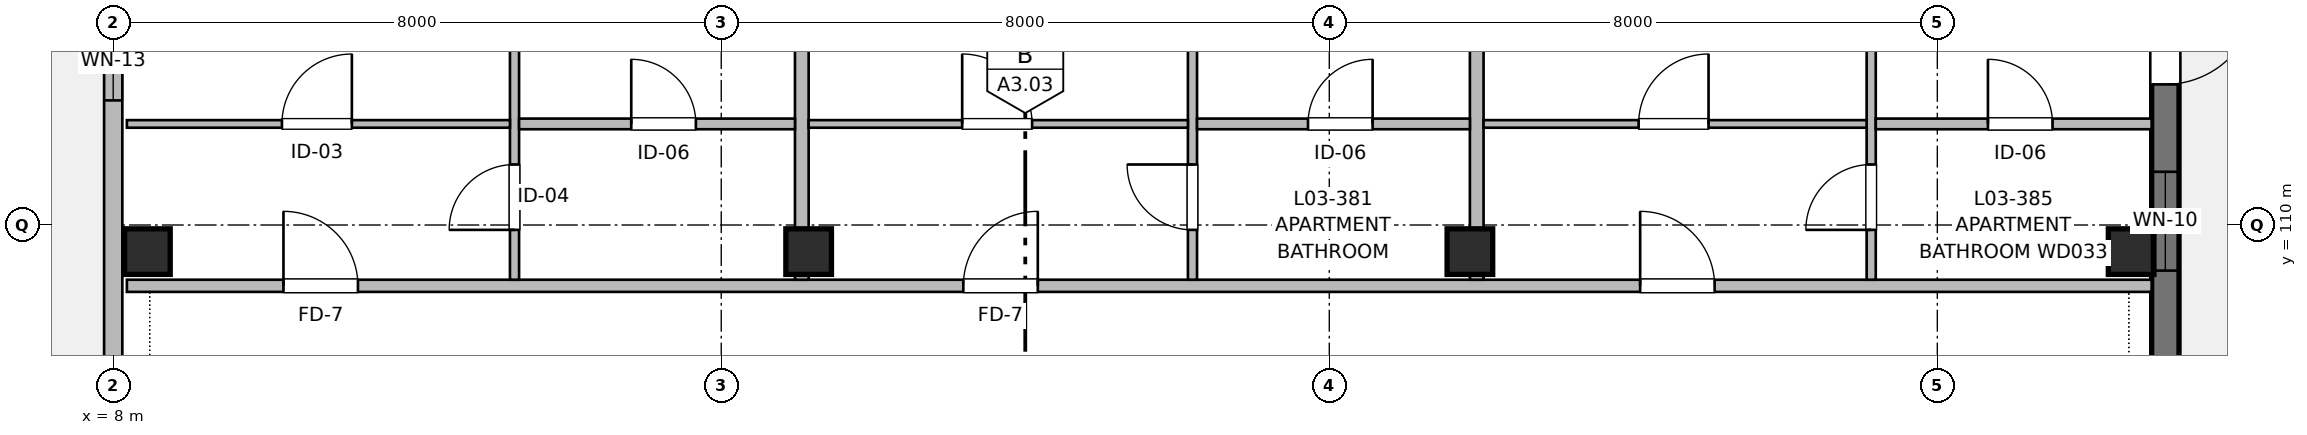
"""IFC4 building model, lengths in metres.
Left out: names, types, materials, properties, quantities, classifications, styles, units other than length and angle.
Written with IfcOpenShell. Run it as: python <this file> out.ifc"""

import sys

from ifc_helpers import new_model, si_unit, direction, frame, frame_2d, origin, origin_2d, place, context, subcontext, project, spatial, rectangle, extrude, element, fill, save


model = new_model("IFC4")
c1 = context("Model", 3, precision=1e-05, world=origin(), true_north=direction((0.0, 1.0)))
c2 = subcontext(c1, "Body", "Model", "MODEL_VIEW")
j1 = project(units=[si_unit("LENGTHUNIT", "METRE"), si_unit("PLANEANGLEUNIT", "RADIAN")], contexts=[c1])
p1 = place(None, origin())
s1 = spatial("IfcSite", under=j1, at=p1, CompositionType="ELEMENT")
p2 = place(p1, origin())
s2 = spatial("IfcBuilding", under=s1, at=p2, CompositionType="ELEMENT")
p3 = place(p2, frame((0.0, 0.0, 10.56)))
s3 = spatial("IfcBuildingStorey", under=s2, at=p3, CompositionType="ELEMENT", Elevation=10.56)
for number, where, z_axis, x_axis in (
    (1, (8.45, 109.65, 0.0), (0.0, 0.0, 1.0), (1.0, 0.0, 0.0)),
    (2, (17.15, 109.65, 0.0), (0.0, 0.0, 1.0), (1.0, 0.0, 0.0)),
    (3, (25.85, 109.65, 0.0), (0.0, 0.0, 1.0), (1.0, 0.0, 0.0)),
    (4, (34.55, 109.65, 0.0), (0.0, 0.0, 1.0), (1.0, 0.0, 0.0)),
):
    element("IfcColumn", number, at=place(p3, frame(where, z_axis=z_axis, x_axis=x_axis)), inside=s3, PredefinedType="COLUMN", context=c2, shape_type="SweptSolid", body=[
        extrude(rectangle(XDim=0.6, YDim=0.6, at=origin_2d()), origin(), (0.0, 0.0, 1.0), 3.2),
    ])
p4 = place(p3, frame((35.0, 116.0, 0.0), z_axis=(0.0, 0.0, 1.0), x_axis=(0.0, -1.0, 0.0)))
e5 = element("IfcWall", 5, at=p4, inside=s3, PredefinedType="SHEAR", context=c2, shape_type="SweptSolid", body=[
    extrude(rectangle(XDim=16.0, YDim=0.36, at=frame_2d((8.0, 0.0))), origin(), (0.0, 0.0, 1.0), 2.98),
])
p5 = place(p4, frame((2.95, 0.0, 0.0)))
e6 = element("IfcOpeningElement", 6, at=p5, cuts=e5, PredefinedType="OPENING", context=c2, shape_type="SweptSolid", body=[
    extrude(rectangle(XDim=1.2, YDim=2.2, at=frame_2d((0.6, 1.1))), frame((0.0, 0.19, 0.0), z_axis=(0.0, -1.0, 0.0), x_axis=(1.0, 0.0, 0.0)), (0.0, 0.0, 1.0), 0.38),
])
p6 = place(p4, frame((5.3, 0.0, 0.82)))
e7 = element("IfcOpeningElement", 7, at=p6, cuts=e5, PredefinedType="OPENING", context=c2, shape_type="SweptSolid", body=[
    extrude(rectangle(XDim=1.3, YDim=1.4, at=frame_2d((0.65, 0.7))), frame((0.0, 0.19, 0.0), z_axis=(0.0, -1.0, 0.0), x_axis=(1.0, 0.0, 0.0)), (0.0, 0.0, 1.0), 0.38),
])
p7 = place(p4, frame((11.3, 0.0, 0.87)))
e8 = element("IfcOpeningElement", 8, at=p7, cuts=e5, PredefinedType="OPENING", context=c2, shape_type="SweptSolid", body=[
    extrude(rectangle(XDim=1.4, YDim=1.35, at=frame_2d((0.7, 0.675))), frame((0.0, 0.19, 0.0), z_axis=(0.0, -1.0, 0.0), x_axis=(1.0, 0.0, 0.0)), (0.0, 0.0, 1.0), 0.38),
])
p8 = place(p3, frame((8.0, 56.0, 0.0), z_axis=(0.0, 0.0, 1.0), x_axis=(0.0, 1.0, 0.0)))
e9 = element("IfcWall", 9, at=p8, inside=s3, PredefinedType="SOLIDWALL", context=c2, shape_type="SweptSolid", body=[
    extrude(rectangle(XDim=60.0, YDim=0.24, at=frame_2d((30.0, 0.0))), origin(), (0.0, 0.0, 1.0), 2.98),
])
p9 = place(p8, frame((4.886, 0.0, 0.0)))
e10 = element("IfcOpeningElement", 10, at=p9, cuts=e9, PredefinedType="OPENING", context=c2, shape_type="SweptSolid", body=[
    extrude(rectangle(XDim=1.2, YDim=2.2, at=frame_2d((0.6, 1.1))), frame((0.0, 0.13, 0.0), z_axis=(0.0, -1.0, 0.0), x_axis=(1.0, 0.0, 0.0)), (0.0, 0.0, 1.0), 0.26),
])
p10 = place(p8, frame((12.157, 0.0, 0.87)))
e11 = element("IfcOpeningElement", 11, at=p10, cuts=e9, PredefinedType="OPENING", context=c2, shape_type="SweptSolid", body=[
    extrude(rectangle(XDim=1.4, YDim=1.35, at=frame_2d((0.7, 0.675))), frame((0.0, 0.13, 0.0), z_axis=(0.0, -1.0, 0.0), x_axis=(1.0, 0.0, 0.0)), (0.0, 0.0, 1.0), 0.26),
])
p11 = place(p8, frame((20.354, 0.0, 0.87)))
e12 = element("IfcOpeningElement", 12, at=p11, cuts=e9, PredefinedType="OPENING", context=c2, shape_type="SweptSolid", body=[
    extrude(rectangle(XDim=1.25, YDim=1.35, at=frame_2d((0.625, 0.675))), frame((0.0, 0.13, 0.0), z_axis=(0.0, -1.0, 0.0), x_axis=(1.0, 0.0, 0.0)), (0.0, 0.0, 1.0), 0.26),
])
p12 = place(p8, frame((29.35, 0.0, 0.82)))
e13 = element("IfcOpeningElement", 13, at=p12, cuts=e9, PredefinedType="OPENING", context=c2, shape_type="SweptSolid", body=[
    extrude(rectangle(XDim=1.3, YDim=1.4, at=frame_2d((0.65, 0.7))), frame((0.0, 0.13, 0.0), z_axis=(0.0, -1.0, 0.0), x_axis=(1.0, 0.0, 0.0)), (0.0, 0.0, 1.0), 0.26),
])
p13 = place(p8, frame((37.521, 0.0, 0.67)))
e14 = element("IfcOpeningElement", 14, at=p13, cuts=e9, PredefinedType="OPENING", context=c2, shape_type="SweptSolid", body=[
    extrude(rectangle(XDim=2.1, YDim=1.55, at=frame_2d((1.05, 0.775))), frame((0.0, 0.13, 0.0), z_axis=(0.0, -1.0, 0.0), x_axis=(1.0, 0.0, 0.0)), (0.0, 0.0, 1.0), 0.26),
])
p14 = place(p8, frame((55.639, 0.0, 0.9)))
e15 = element("IfcOpeningElement", 15, at=p14, cuts=e9, PredefinedType="OPENING", context=c2, shape_type="SweptSolid", body=[
    extrude(rectangle(XDim=1.05, YDim=1.15, at=frame_2d((0.525, 0.575))), frame((0.0, 0.13, 0.0), z_axis=(0.0, -1.0, 0.0), x_axis=(1.0, 0.0, 0.0)), (0.0, 0.0, 1.0), 0.26),
])
p15 = place(p3, frame((8.18, 109.2, 0.0), z_axis=(0.0, 0.0, 1.0), x_axis=(1.0, 0.0, 0.0)))
e16 = element("IfcWall", 16, at=p15, inside=s3, PredefinedType="PARTITIONING", context=c2, shape_type="SweptSolid", body=[
    extrude(rectangle(XDim=26.64, YDim=0.16, at=frame_2d((13.32, 0.0))), origin(), (0.0, 0.0, 1.0), 2.935),
])
p16 = place(p15, frame((2.06, 0.0, 0.0)))
e17 = element("IfcOpeningElement", 17, at=p16, cuts=e16, PredefinedType="OPENING", context=c2, shape_type="SweptSolid", body=[
    extrude(rectangle(XDim=0.98, YDim=2.15, at=frame_2d((0.49, 1.075))), frame((0.0, 0.09, 0.0), z_axis=(0.0, -1.0, 0.0), x_axis=(1.0, 0.0, 0.0)), (0.0, 0.0, 1.0), 0.18),
])
p17 = place(p15, frame((11.005, 0.0, 0.0)))
e18 = element("IfcOpeningElement", 18, at=p17, cuts=e16, PredefinedType="OPENING", context=c2, shape_type="SweptSolid", body=[
    extrude(rectangle(XDim=0.98, YDim=2.15, at=frame_2d((0.49, 1.075))), frame((0.0, 0.09, 0.0), z_axis=(0.0, -1.0, 0.0), x_axis=(1.0, 0.0, 0.0)), (0.0, 0.0, 1.0), 0.18),
])
p18 = place(p15, frame((19.91, 0.0, 0.0)))
e19 = element("IfcOpeningElement", 19, at=p18, cuts=e16, PredefinedType="OPENING", context=c2, shape_type="SweptSolid", body=[
    extrude(rectangle(XDim=0.98, YDim=2.15, at=frame_2d((0.49, 1.075))), frame((0.0, 0.09, 0.0), z_axis=(0.0, -1.0, 0.0), x_axis=(1.0, 0.0, 0.0)), (0.0, 0.0, 1.0), 0.18),
])
for number, where, z_axis, x_axis in (
    (20, (17.06, 109.28, 0.0), (0.0, 0.0, 1.0), (0.0, 1.0, 0.0)),
    (21, (25.94, 109.28, 0.0), (0.0, 0.0, 1.0), (0.0, 1.0, 0.0)),
):
    element("IfcWall", number, at=place(p3, frame(where, z_axis=z_axis, x_axis=x_axis)), inside=s3, PredefinedType="PARTITIONING", context=c2, shape_type="SweptSolid", body=[
        extrude(rectangle(XDim=6.6, YDim=0.18, at=frame_2d((3.3, 0.0))), origin(), (0.0, 0.0, 1.0), 2.68),
    ])
p19 = place(p3, frame((13.28, 109.28, 0.0), z_axis=(0.0, 0.0, 1.0), x_axis=(0.0, 1.0, 0.0)))
e22 = element("IfcWall", 22, at=p19, inside=s3, PredefinedType="PARTITIONING", context=c2, shape_type="SweptSolid", body=[
    extrude(rectangle(XDim=6.6, YDim=0.12, at=frame_2d((3.3, 0.0))), origin(), (0.0, 0.0, 1.0), 2.935),
])
p20 = place(p19, frame((0.656, 0.0, 0.0)))
e23 = element("IfcOpeningElement", 23, at=p20, cuts=e22, PredefinedType="OPENING", context=c2, shape_type="SweptSolid", body=[
    extrude(rectangle(XDim=0.86, YDim=2.1, at=frame_2d((0.43, 1.05))), frame((0.0, 0.07, 0.0), z_axis=(0.0, -1.0, 0.0), x_axis=(1.0, 0.0, 0.0)), (0.0, 0.0, 1.0), 0.14),
])
p21 = place(p19, frame((4.097, 0.0, 0.0)))
e24 = element("IfcOpeningElement", 24, at=p21, cuts=e22, PredefinedType="OPENING", context=c2, shape_type="SweptSolid", body=[
    extrude(rectangle(XDim=0.9, YDim=2.1, at=frame_2d((0.45, 1.05))), frame((0.0, 0.07, 0.0), z_axis=(0.0, -1.0, 0.0), x_axis=(1.0, 0.0, 0.0)), (0.0, 0.0, 1.0), 0.14),
])
p22 = place(p3, frame((13.34, 111.33, 0.0), z_axis=(0.0, 0.0, 1.0), x_axis=(1.0, 0.0, 0.0)))
e25 = element("IfcWall", 25, at=p22, inside=s3, PredefinedType="PARTITIONING", context=c2, shape_type="SweptSolid", body=[
    extrude(rectangle(XDim=3.63, YDim=0.14, at=frame_2d((1.815, 0.0))), origin(), (0.0, 0.0, 1.0), 2.935),
])
p23 = place(p22, frame((1.476, 0.0, 0.0)))
e26 = element("IfcOpeningElement", 26, at=p23, cuts=e25, PredefinedType="OPENING", context=c2, shape_type="SweptSolid", body=[
    extrude(rectangle(XDim=0.85, YDim=2.05, at=frame_2d((0.425, 1.025))), frame((0.0, 0.08, 0.0), z_axis=(0.0, -1.0, 0.0), x_axis=(1.0, 0.0, 0.0)), (0.0, 0.0, 1.0), 0.16),
])
p24 = place(p3, frame((8.18, 111.33, 0.0), z_axis=(0.0, 0.0, 1.0), x_axis=(1.0, 0.0, 0.0)))
e27 = element("IfcWall", 27, at=p24, inside=s3, PredefinedType="PARTITIONING", context=c2, shape_type="SweptSolid", body=[
    extrude(rectangle(XDim=5.04, YDim=0.1, at=frame_2d((2.52, 0.0))), origin(), (0.0, 0.0, 1.0), 2.935),
])
p25 = place(p24, frame((2.04, 0.0, 0.0)))
e28 = element("IfcOpeningElement", 28, at=p25, cuts=e27, PredefinedType="OPENING", context=c2, shape_type="SweptSolid", body=[
    extrude(rectangle(XDim=0.92, YDim=2.1, at=frame_2d((0.46, 1.05))), frame((0.0, 0.06, 0.0), z_axis=(0.0, -1.0, 0.0), x_axis=(1.0, 0.0, 0.0)), (0.0, 0.0, 1.0), 0.12),
])
p26 = place(p3, frame((22.2, 109.28, 0.0), z_axis=(0.0, 0.0, 1.0), x_axis=(0.0, 1.0, 0.0)))
e29 = element("IfcWall", 29, at=p26, inside=s3, PredefinedType="PARTITIONING", context=c2, shape_type="SweptSolid", body=[
    extrude(rectangle(XDim=6.6, YDim=0.12, at=frame_2d((3.3, 0.0))), origin(), (0.0, 0.0, 1.0), 2.935),
])
p27 = place(p26, frame((0.656, 0.0, 0.0)))
e30 = element("IfcOpeningElement", 30, at=p27, cuts=e29, PredefinedType="OPENING", context=c2, shape_type="SweptSolid", body=[
    extrude(rectangle(XDim=0.86, YDim=2.1, at=frame_2d((0.43, 1.05))), frame((0.0, 0.07, 0.0), z_axis=(0.0, -1.0, 0.0), x_axis=(1.0, 0.0, 0.0)), (0.0, 0.0, 1.0), 0.14),
])
p28 = place(p26, frame((4.097, 0.0, 0.0)))
e31 = element("IfcOpeningElement", 31, at=p28, cuts=e29, PredefinedType="OPENING", context=c2, shape_type="SweptSolid", body=[
    extrude(rectangle(XDim=0.9, YDim=2.1, at=frame_2d((0.45, 1.05))), frame((0.0, 0.07, 0.0), z_axis=(0.0, -1.0, 0.0), x_axis=(1.0, 0.0, 0.0)), (0.0, 0.0, 1.0), 0.14),
])
p29 = place(p3, frame((22.26, 111.33, 0.0), z_axis=(0.0, 0.0, 1.0), x_axis=(1.0, 0.0, 0.0)))
e32 = element("IfcWall", 32, at=p29, inside=s3, PredefinedType="PARTITIONING", context=c2, shape_type="SweptSolid", body=[
    extrude(rectangle(XDim=3.59, YDim=0.14, at=frame_2d((1.795, 0.0))), origin(), (0.0, 0.0, 1.0), 2.935),
])
p30 = place(p29, frame((1.46, 0.0, 0.0)))
e33 = element("IfcOpeningElement", 33, at=p30, cuts=e32, PredefinedType="OPENING", context=c2, shape_type="SweptSolid", body=[
    extrude(rectangle(XDim=0.85, YDim=2.05, at=frame_2d((0.425, 1.025))), frame((0.0, 0.08, 0.0), z_axis=(0.0, -1.0, 0.0), x_axis=(1.0, 0.0, 0.0)), (0.0, 0.0, 1.0), 0.16),
])
p31 = place(p3, frame((17.15, 111.33, 0.0), z_axis=(0.0, 0.0, 1.0), x_axis=(1.0, 0.0, 0.0)))
e34 = element("IfcWall", 34, at=p31, inside=s3, PredefinedType="PARTITIONING", context=c2, shape_type="SweptSolid", body=[
    extrude(rectangle(XDim=4.99, YDim=0.1, at=frame_2d((2.495, 0.0))), origin(), (0.0, 0.0, 1.0), 2.935),
])
p32 = place(p31, frame((2.02, 0.0, 0.0)))
e35 = element("IfcOpeningElement", 35, at=p32, cuts=e34, PredefinedType="OPENING", context=c2, shape_type="SweptSolid", body=[
    extrude(rectangle(XDim=0.92, YDim=2.1, at=frame_2d((0.46, 1.05))), frame((0.0, 0.06, 0.0), z_axis=(0.0, -1.0, 0.0), x_axis=(1.0, 0.0, 0.0)), (0.0, 0.0, 1.0), 0.12),
])
p33 = place(p3, frame((31.13, 109.28, 0.0), z_axis=(0.0, 0.0, 1.0), x_axis=(0.0, 1.0, 0.0)))
e36 = element("IfcWall", 36, at=p33, inside=s3, PredefinedType="PARTITIONING", context=c2, shape_type="SweptSolid", body=[
    extrude(rectangle(XDim=6.6, YDim=0.12, at=frame_2d((3.3, 0.0))), origin(), (0.0, 0.0, 1.0), 2.935),
])
p34 = place(p33, frame((0.656, 0.0, 0.0)))
e37 = element("IfcOpeningElement", 37, at=p34, cuts=e36, PredefinedType="OPENING", context=c2, shape_type="SweptSolid", body=[
    extrude(rectangle(XDim=0.86, YDim=2.1, at=frame_2d((0.43, 1.05))), frame((0.0, 0.07, 0.0), z_axis=(0.0, -1.0, 0.0), x_axis=(1.0, 0.0, 0.0)), (0.0, 0.0, 1.0), 0.14),
])
p35 = place(p33, frame((4.097, 0.0, 0.0)))
e38 = element("IfcOpeningElement", 38, at=p35, cuts=e36, PredefinedType="OPENING", context=c2, shape_type="SweptSolid", body=[
    extrude(rectangle(XDim=0.9, YDim=2.1, at=frame_2d((0.45, 1.05))), frame((0.0, 0.07, 0.0), z_axis=(0.0, -1.0, 0.0), x_axis=(1.0, 0.0, 0.0)), (0.0, 0.0, 1.0), 0.14),
])
p36 = place(p3, frame((31.19, 111.33, 0.0), z_axis=(0.0, 0.0, 1.0), x_axis=(1.0, 0.0, 0.0)))
e39 = element("IfcWall", 39, at=p36, inside=s3, PredefinedType="PARTITIONING", context=c2, shape_type="SweptSolid", body=[
    extrude(rectangle(XDim=3.63, YDim=0.14, at=frame_2d((1.815, 0.0))), origin(), (0.0, 0.0, 1.0), 2.935),
])
p37 = place(p36, frame((1.476, 0.0, 0.0)))
e40 = element("IfcOpeningElement", 40, at=p37, cuts=e39, PredefinedType="OPENING", context=c2, shape_type="SweptSolid", body=[
    extrude(rectangle(XDim=0.85, YDim=2.05, at=frame_2d((0.425, 1.025))), frame((0.0, 0.08, 0.0), z_axis=(0.0, -1.0, 0.0), x_axis=(1.0, 0.0, 0.0)), (0.0, 0.0, 1.0), 0.16),
])
p38 = place(p3, frame((26.03, 111.33, 0.0), z_axis=(0.0, 0.0, 1.0), x_axis=(1.0, 0.0, 0.0)))
e41 = element("IfcWall", 41, at=p38, inside=s3, PredefinedType="PARTITIONING", context=c2, shape_type="SweptSolid", body=[
    extrude(rectangle(XDim=5.04, YDim=0.1, at=frame_2d((2.52, 0.0))), origin(), (0.0, 0.0, 1.0), 2.935),
])
p39 = place(p38, frame((2.04, 0.0, 0.0)))
e42 = element("IfcOpeningElement", 42, at=p39, cuts=e41, PredefinedType="OPENING", context=c2, shape_type="SweptSolid", body=[
    extrude(rectangle(XDim=0.92, YDim=2.1, at=frame_2d((0.46, 1.05))), frame((0.0, 0.06, 0.0), z_axis=(0.0, -1.0, 0.0), x_axis=(1.0, 0.0, 0.0)), (0.0, 0.0, 1.0), 0.12),
])
p40 = place(p5, origin())
e43 = element("IfcDoor", 43, at=p40, inside=s3, OperationType="SINGLE_SWING_LEFT", PredefinedType="DOOR", context=c2, shape_type="SweptSolid", body=[
    extrude(rectangle(XDim=1.2, YDim=2.2, at=frame_2d((0.6, 1.1))), frame((0.0, 0.025, 0.0), z_axis=(0.0, -1.0, 0.0), x_axis=(1.0, 0.0, 0.0)), (0.0, 0.0, 1.0), 0.05),
])
fill(e6, e43)
p41 = place(p6, origin())
e44 = element("IfcWindow", 44, at=p41, inside=s3, PartitioningType="SINGLE_PANEL", PredefinedType="WINDOW", context=c2, shape_type="SweptSolid", body=[
    extrude(rectangle(XDim=1.3, YDim=1.4, at=frame_2d((0.65, 0.7))), frame((0.0, 0.03, 0.0), z_axis=(0.0, -1.0, 0.0), x_axis=(1.0, 0.0, 0.0)), (0.0, 0.0, 1.0), 0.06),
])
fill(e7, e44)
p42 = place(p14, origin())
e45 = element("IfcWindow", 45, at=p42, inside=s3, PartitioningType="SINGLE_PANEL", PredefinedType="WINDOW", context=c2, shape_type="SweptSolid", body=[
    extrude(rectangle(XDim=1.05, YDim=1.15, at=frame_2d((0.525, 0.575))), frame((0.0, 0.03, 0.0), z_axis=(0.0, -1.0, 0.0), x_axis=(1.0, 0.0, 0.0)), (0.0, 0.0, 1.0), 0.06),
])
fill(e15, e45)
p43 = place(p16, origin())
e46 = element("IfcDoor", 46, at=p43, inside=s3, OperationType="SINGLE_SWING_LEFT", PredefinedType="DOOR", context=c2, shape_type="SweptSolid", body=[
    extrude(rectangle(XDim=0.98, YDim=2.15, at=frame_2d((0.49, 1.075))), frame((0.0, 0.025, 0.0), z_axis=(0.0, -1.0, 0.0), x_axis=(1.0, 0.0, 0.0)), (0.0, 0.0, 1.0), 0.05),
])
fill(e17, e46)
p44 = place(p25, origin())
e47 = element("IfcDoor", 47, at=p44, inside=s3, OperationType="SINGLE_SWING_RIGHT", PredefinedType="DOOR", context=c2, shape_type="SweptSolid", body=[
    extrude(rectangle(XDim=0.92, YDim=2.1, at=frame_2d((0.46, 1.05))), frame((0.0, 0.025, 0.0), z_axis=(0.0, -1.0, 0.0), x_axis=(1.0, 0.0, 0.0)), (0.0, 0.0, 1.0), 0.05),
])
fill(e28, e47)
p45 = place(p20, origin())
e48 = element("IfcDoor", 48, at=p45, inside=s3, OperationType="SINGLE_SWING_LEFT", PredefinedType="DOOR", context=c2, shape_type="SweptSolid", body=[
    extrude(rectangle(XDim=0.86, YDim=2.1, at=frame_2d((0.43, 1.05))), frame((0.0, 0.025, 0.0), z_axis=(0.0, -1.0, 0.0), x_axis=(1.0, 0.0, 0.0)), (0.0, 0.0, 1.0), 0.05),
])
fill(e23, e48)
p46 = place(p23, origin())
e49 = element("IfcDoor", 49, at=p46, inside=s3, OperationType="SINGLE_SWING_LEFT", PredefinedType="DOOR", context=c2, shape_type="SweptSolid", body=[
    extrude(rectangle(XDim=0.85, YDim=2.05, at=frame_2d((0.425, 1.025))), frame((0.0, 0.025, 0.0), z_axis=(0.0, -1.0, 0.0), x_axis=(1.0, 0.0, 0.0)), (0.0, 0.0, 1.0), 0.05),
])
fill(e26, e49)
p47 = place(p17, origin())
e50 = element("IfcDoor", 50, at=p47, inside=s3, OperationType="SINGLE_SWING_RIGHT", PredefinedType="DOOR", context=c2, shape_type="SweptSolid", body=[
    extrude(rectangle(XDim=0.98, YDim=2.15, at=frame_2d((0.49, 1.075))), frame((0.0, 0.025, 0.0), z_axis=(0.0, -1.0, 0.0), x_axis=(1.0, 0.0, 0.0)), (0.0, 0.0, 1.0), 0.05),
])
fill(e18, e50)
p48 = place(p32, origin())
e51 = element("IfcDoor", 51, at=p48, inside=s3, OperationType="SINGLE_SWING_LEFT", PredefinedType="DOOR", context=c2, shape_type="SweptSolid", body=[
    extrude(rectangle(XDim=0.92, YDim=2.1, at=frame_2d((0.46, 1.05))), frame((0.0, 0.025, 0.0), z_axis=(0.0, -1.0, 0.0), x_axis=(1.0, 0.0, 0.0)), (0.0, 0.0, 1.0), 0.05),
])
fill(e35, e51)
p49 = place(p27, origin())
e52 = element("IfcDoor", 52, at=p49, inside=s3, OperationType="SINGLE_SWING_RIGHT", PredefinedType="DOOR", context=c2, shape_type="SweptSolid", body=[
    extrude(rectangle(XDim=0.86, YDim=2.1, at=frame_2d((0.43, 1.05))), frame((0.0, 0.025, 0.0), z_axis=(0.0, -1.0, 0.0), x_axis=(1.0, 0.0, 0.0)), (0.0, 0.0, 1.0), 0.05),
])
fill(e30, e52)
p50 = place(p30, origin())
e53 = element("IfcDoor", 53, at=p50, inside=s3, OperationType="SINGLE_SWING_RIGHT", PredefinedType="DOOR", context=c2, shape_type="SweptSolid", body=[
    extrude(rectangle(XDim=0.85, YDim=2.05, at=frame_2d((0.425, 1.025))), frame((0.0, 0.025, 0.0), z_axis=(0.0, -1.0, 0.0), x_axis=(1.0, 0.0, 0.0)), (0.0, 0.0, 1.0), 0.05),
])
fill(e33, e53)
p51 = place(p18, origin())
e54 = element("IfcDoor", 54, at=p51, inside=s3, OperationType="SINGLE_SWING_LEFT", PredefinedType="DOOR", context=c2, shape_type="SweptSolid", body=[
    extrude(rectangle(XDim=0.98, YDim=2.15, at=frame_2d((0.49, 1.075))), frame((0.0, 0.025, 0.0), z_axis=(0.0, -1.0, 0.0), x_axis=(1.0, 0.0, 0.0)), (0.0, 0.0, 1.0), 0.05),
])
fill(e19, e54)
p52 = place(p39, origin())
e55 = element("IfcDoor", 55, at=p52, inside=s3, OperationType="SINGLE_SWING_RIGHT", PredefinedType="DOOR", context=c2, shape_type="SweptSolid", body=[
    extrude(rectangle(XDim=0.92, YDim=2.1, at=frame_2d((0.46, 1.05))), frame((0.0, 0.025, 0.0), z_axis=(0.0, -1.0, 0.0), x_axis=(1.0, 0.0, 0.0)), (0.0, 0.0, 1.0), 0.05),
])
fill(e42, e55)
p53 = place(p34, origin())
e56 = element("IfcDoor", 56, at=p53, inside=s3, OperationType="SINGLE_SWING_LEFT", PredefinedType="DOOR", context=c2, shape_type="SweptSolid", body=[
    extrude(rectangle(XDim=0.86, YDim=2.1, at=frame_2d((0.43, 1.05))), frame((0.0, 0.025, 0.0), z_axis=(0.0, -1.0, 0.0), x_axis=(1.0, 0.0, 0.0)), (0.0, 0.0, 1.0), 0.05),
])
fill(e37, e56)
p54 = place(p37, origin())
e57 = element("IfcDoor", 57, at=p54, inside=s3, OperationType="SINGLE_SWING_LEFT", PredefinedType="DOOR", context=c2, shape_type="SweptSolid", body=[
    extrude(rectangle(XDim=0.85, YDim=2.05, at=frame_2d((0.425, 1.025))), frame((0.0, 0.025, 0.0), z_axis=(0.0, -1.0, 0.0), x_axis=(1.0, 0.0, 0.0)), (0.0, 0.0, 1.0), 0.05),
])
fill(e40, e57)
save(model, sys.argv[1])
